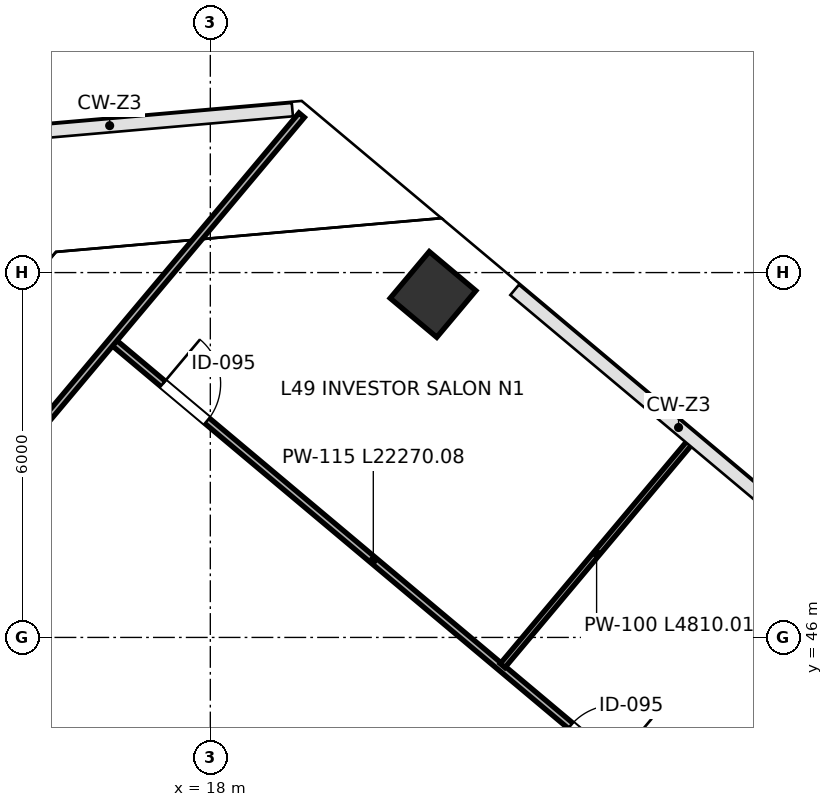
"""IFC4 building model, lengths in metres.
Left out: names, types, materials, properties, quantities, classifications, styles, units other than length and angle.
Written with IfcOpenShell. Run it as: python <this file> out.ifc"""

import sys

from ifc_helpers import new_model, si_unit, direction, frame, frame_2d, origin, origin_2d, place, context, subcontext, project, spatial, rectangle, extrude, source, transform, mapped, element, fill, save


model = new_model("IFC4")
c1 = context("Model", 3, precision=1e-05, world=origin(), true_north=direction((0.0, 1.0)))
c2 = subcontext(c1, "Body", "Model", "MODEL_VIEW")
j1 = project(units=[si_unit("LENGTHUNIT", "METRE"), si_unit("PLANEANGLEUNIT", "RADIAN")], contexts=[c1])
p1 = place(None, origin())
s1 = spatial("IfcSite", under=j1, at=p1, CompositionType="ELEMENT")
p2 = place(p1, origin())
s2 = spatial("IfcBuilding", under=s1, at=p2, CompositionType="ELEMENT")
p3 = place(p2, frame((0.0, 0.0, 220.6)))
s3 = spatial("IfcBuildingStorey", under=s2, at=p3, CompositionType="ELEMENT", Elevation=220.6)
m1 = source(origin(), c2, "Body", "SweptSolid", [
    extrude(rectangle(XDim=1.0, YDim=1.0, at=origin_2d()), origin(), (0.0, 0.0, 1.0), 4.198),
])
p4 = place(p3, frame((21.663, 51.64, 0.001), z_axis=(0.0, 0.0, 1.0), x_axis=(-0.766044443119, 0.642787609687, 0.0)))
e1 = element("IfcColumn", 1, at=p4, inside=s3, PredefinedType="COLUMN", context=c2, shape_type="MappedRepresentation", body=[
    mapped(m1, transform((0.0, 0.0, 0.0), scale=1.0)),
])
p5 = place(p3, frame((16.416, 50.848, 0.0), z_axis=(0.0, 0.0, 1.0), x_axis=(0.766043174175, -0.642789121951, 0.0)))
e2 = element("IfcWall", 2, at=p5, inside=s3, PredefinedType="PARTITIONING", context=c2, shape_type="SweptSolid", body=[
    extrude(rectangle(XDim=22.27, YDim=0.115, at=frame_2d((11.135, 0.0))), origin(), (0.0, 0.0, 1.0), 3.96),
])
p6 = place(p5, frame((1.05, 0.0, 0.0)))
e3 = element("IfcOpeningElement", 3, at=p6, cuts=e2, PredefinedType="OPENING", context=c2, shape_type="SweptSolid", body=[
    extrude(rectangle(XDim=0.95, YDim=2.15, at=frame_2d((0.475, 1.075))), frame((0.0, 0.067, 0.0), z_axis=(0.0, -1.0, 0.0), x_axis=(1.0, 0.0, 0.0)), (0.0, 0.0, 1.0), 0.135),
])
p7 = place(p5, frame((9.8, 0.0, 0.0)))
e4 = element("IfcOpeningElement", 4, at=p7, cuts=e2, PredefinedType="OPENING", context=c2, shape_type="SweptSolid", body=[
    extrude(rectangle(XDim=0.95, YDim=2.15, at=frame_2d((0.475, 1.075))), frame((0.0, 0.067, 0.0), z_axis=(0.0, -1.0, 0.0), x_axis=(1.0, 0.0, 0.0)), (0.0, 0.0, 1.0), 0.135),
])
p8 = place(p3, frame((22.807, 45.537, 0.0), z_axis=(0.0, 0.0, 1.0), x_axis=(0.642796794607, 0.766036735961, 0.0)))
e5 = element("IfcWall", 5, at=p8, inside=s3, PredefinedType="PARTITIONING", context=c2, shape_type="SweptSolid", body=[
    extrude(rectangle(XDim=4.81, YDim=0.1, at=frame_2d((2.405, 0.0))), origin(), (0.0, 0.0, 1.0), 3.195),
])
p9 = place(p3, frame((0.894, 32.412, 0.0), z_axis=(0.0, 0.0, 1.0), x_axis=(0.642782006196, 0.766049144971, 0.0)))
e6 = element("IfcWall", 6, at=p9, inside=s3, PredefinedType="PARTITIONING", context=c2, shape_type="SweptSolid", body=[
    extrude(rectangle(XDim=28.95, YDim=0.115, at=frame_2d((14.475, 0.0))), origin(), (0.0, 0.0, 1.0), 3.96),
])
p10 = place(p9, frame((2.2, 0.0, 0.0)))
e7 = element("IfcOpeningElement", 7, at=p10, cuts=e6, PredefinedType="OPENING", context=c2, shape_type="SweptSolid", body=[
    extrude(rectangle(XDim=0.95, YDim=2.15, at=frame_2d((0.475, 1.075))), frame((0.0, 0.067, 0.0), z_axis=(0.0, -1.0, 0.0), x_axis=(1.0, 0.0, 0.0)), (0.0, 0.0, 1.0), 0.135),
])
m2 = source(origin(), c2, "Body", "SweptSolid", [
    extrude(rectangle(XDim=0.95, YDim=2.15, at=frame_2d((0.475, 1.075))), frame((0.0, 0.025, 0.0), z_axis=(0.0, -1.0, 0.0), x_axis=(1.0, 0.0, 0.0)), (0.0, 0.0, 1.0), 0.05),
])
p11 = place(p6, origin())
e8 = element("IfcDoor", 8, at=p11, inside=s3, OperationType="SINGLE_SWING_LEFT", PredefinedType="DOOR", context=c2, shape_type="MappedRepresentation", body=[
    mapped(m2, transform((0.0, 0.0, 0.0), scale=1.0)),
])
fill(e3, e8)
p12 = place(p7, origin())
e9 = element("IfcDoor", 9, at=p12, inside=s3, OperationType="SINGLE_SWING_RIGHT", PredefinedType="DOOR", context=c2, shape_type="MappedRepresentation", body=[
    mapped(m2, transform((0.0, 0.0, 0.0), scale=1.0)),
])
fill(e4, e9)
save(model, sys.argv[1])
